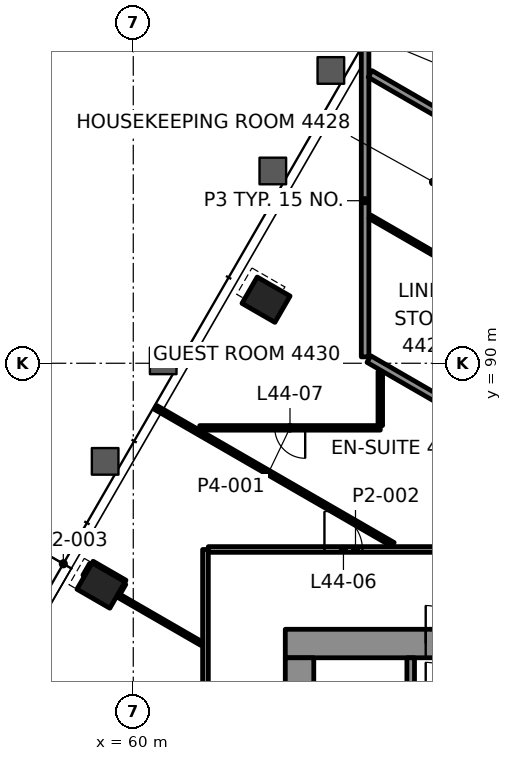
"""IFC4 building model, lengths in metres.
Left out: names, types, materials, properties, quantities, classifications, styles, units other than length and angle.
Written with IfcOpenShell. Run it as: python <this file> out.ifc"""

import sys

from ifc_helpers import new_model, si_unit, direction, frame, frame_2d, origin, origin_2d, place, context, subcontext, project, spatial, rectangle, hollow_rectangle, extrude, element, fill, save


model = new_model("IFC4")
c1 = context("Model", 3, precision=1e-05, world=origin(), true_north=direction((0.0, 1.0)))
c2 = subcontext(c1, "Body", "Model", "MODEL_VIEW")
j1 = project(units=[si_unit("LENGTHUNIT", "METRE"), si_unit("PLANEANGLEUNIT", "RADIAN")], contexts=[c1])
p1 = place(None, origin())
s1 = spatial("IfcSite", under=j1, at=p1, CompositionType="ELEMENT")
p2 = place(p1, origin())
s2 = spatial("IfcBuilding", under=s1, at=p2, CompositionType="ELEMENT")
p3 = place(p2, frame((0.0, 0.0, 190.9)))
s3 = spatial("IfcBuildingStorey", under=s2, at=p3, CompositionType="ELEMENT", Elevation=190.9)
for number, where, z_axis, x_axis in (
    (1, (63.494, 91.673, -0.0), (0.0, 0.0, 1.0), (-0.5, -0.866, 0.0)),
    (2, (59.151, 84.151, -0.0), (0.0, 0.0, 1.0), (-0.5, -0.866, 0.0)),
):
    element("IfcColumn", number, at=place(p3, frame(where, z_axis=z_axis, x_axis=x_axis)), inside=s3, PredefinedType="COLUMN", context=c2, shape_type="SweptSolid", body=[
        extrude(hollow_rectangle(XDim=0.8, YDim=1.0, WallThickness=0.05, at=origin_2d()), origin(), (0.0, 0.0, 1.0), 3.9),
    ])
p4 = place(p3, frame((64.0, 82.625, 0.0), z_axis=(0.0, 0.0, 1.0), x_axis=(1.0, 0.0, 0.0)))
e3 = element("IfcWall", 3, at=p4, inside=s3, PredefinedType="SHEAR", context=c2, shape_type="SweptSolid", body=[
    extrude(rectangle(XDim=22.0, YDim=0.75, at=frame_2d((11.0, 0.0))), origin(), (0.0, 0.0, 1.0), 3.7),
])
p5 = place(p4, frame((3.695, 0.0, 0.0)))
e4 = element("IfcOpeningElement", 4, at=p5, cuts=e3, PredefinedType="OPENING", context=c2, shape_type="SweptSolid", body=[
    extrude(rectangle(XDim=1.0, YDim=2.1, at=frame_2d((0.5, 1.05))), frame((0.0, 0.385, 0.0), z_axis=(0.0, -1.0, 0.0), x_axis=(1.0, 0.0, 0.0)), (0.0, 0.0, 1.0), 0.77),
])
p6 = place(p4, frame((17.505, 0.0, 0.0)))
e5 = element("IfcOpeningElement", 5, at=p6, cuts=e3, PredefinedType="OPENING", context=c2, shape_type="SweptSolid", body=[
    extrude(rectangle(XDim=1.0, YDim=2.1, at=frame_2d((0.5, 1.05))), frame((0.0, 0.385, 0.0), z_axis=(0.0, -1.0, 0.0), x_axis=(1.0, 0.0, 0.0)), (0.0, 0.0, 1.0), 0.77),
])
p7 = place(p4, frame((10.65, 0.0, 0.0)))
e6 = element("IfcOpeningElement", 6, at=p7, cuts=e3, PredefinedType="OPENING", context=c2, shape_type="SweptSolid", body=[
    extrude(rectangle(XDim=0.9, YDim=2.1, at=frame_2d((0.45, 1.05))), frame((0.0, 0.385, 0.0), z_axis=(0.0, -1.0, 0.0), x_axis=(1.0, 0.0, 0.0)), (0.0, 0.0, 1.0), 0.77),
])
p8 = place(p3, frame((64.375, 67.75, 0.0), z_axis=(0.0, 0.0, 1.0), x_axis=(0.0, 1.0, 0.0)))
e7 = element("IfcWall", 7, at=p8, inside=s3, PredefinedType="SHEAR", context=c2, shape_type="SweptSolid", body=[
    extrude(rectangle(XDim=14.5, YDim=0.75, at=frame_2d((7.25, 0.0))), origin(), (0.0, 0.0, 1.0), 3.7),
])
p9 = place(p8, frame((4.65, 0.0, 0.0)))
e8 = element("IfcOpeningElement", 8, at=p9, cuts=e7, PredefinedType="OPENING", context=c2, shape_type="SweptSolid", body=[
    extrude(rectangle(XDim=1.8, YDim=2.1, at=frame_2d((0.9, 1.05))), frame((0.0, 0.385, 0.0), z_axis=(0.0, -1.0, 0.0), x_axis=(1.0, 0.0, 0.0)), (0.0, 0.0, 1.0), 0.77),
])
p10 = place(p8, frame((2.55, 0.0, 0.0)))
e9 = element("IfcOpeningElement", 9, at=p10, cuts=e7, PredefinedType="OPENING", context=c2, shape_type="SweptSolid", body=[
    extrude(rectangle(XDim=0.9, YDim=2.1, at=frame_2d((0.45, 1.05))), frame((0.0, 0.385, 0.0), z_axis=(0.0, -1.0, 0.0), x_axis=(1.0, 0.0, 0.0)), (0.0, 0.0, 1.0), 0.77),
])
p11 = place(p8, frame((10.35, 0.0, 0.0)))
e10 = element("IfcOpeningElement", 10, at=p11, cuts=e7, PredefinedType="OPENING", context=c2, shape_type="SweptSolid", body=[
    extrude(rectangle(XDim=0.9, YDim=2.1, at=frame_2d((0.45, 1.05))), frame((0.0, 0.385, 0.0), z_axis=(0.0, -1.0, 0.0), x_axis=(1.0, 0.0, 0.0)), (0.0, 0.0, 1.0), 0.77),
])
p12 = place(p3, frame((61.976, 85.1, 0.0), z_axis=(0.0, 0.0, 1.0), x_axis=(1.0, 0.0, 0.0)))
e11 = element("IfcWall", 11, at=p12, inside=s3, PredefinedType="PARTITIONING", context=c2, shape_type="SweptSolid", body=[
    extrude(rectangle(XDim=7.744, YDim=0.15, at=frame_2d((3.872, 0.0))), origin(), (0.0, 0.0, 1.0), 3.1),
])
p13 = place(p12, frame((3.055, 0.0, 0.0)))
e12 = element("IfcOpeningElement", 12, at=p13, cuts=e11, PredefinedType="OPENING", context=c2, shape_type="SweptSolid", body=[
    extrude(rectangle(XDim=1.0, YDim=2.1, at=frame_2d((0.5, 1.05))), frame((0.0, 0.085, 0.0), z_axis=(0.0, -1.0, 0.0), x_axis=(1.0, 0.0, 0.0)), (0.0, 0.0, 1.0), 0.17),
])
p14 = place(p3, frame((66.5, 88.3, 0.0), z_axis=(0.0, 0.0, 1.0), x_axis=(-1.0, 0.0, 0.0)))
e13 = element("IfcWall", 13, at=p14, inside=s3, PredefinedType="PARTITIONING", context=c2, shape_type="SweptSolid", body=[
    extrude(rectangle(XDim=4.751, YDim=0.12, at=frame_2d((2.376, 0.0))), origin(), (0.0, 0.0, 1.0), 3.097),
])
p15 = place(p14, frame((1.976, 0.0, 0.0)))
e14 = element("IfcOpeningElement", 14, at=p15, cuts=e13, PredefinedType="OPENING", context=c2, shape_type="SweptSolid", body=[
    extrude(rectangle(XDim=0.8, YDim=2.1, at=frame_2d((0.4, 1.05))), frame((0.0, 0.07, 0.0), z_axis=(0.0, -1.0, 0.0), x_axis=(1.0, 0.0, 0.0)), (0.0, 0.0, 1.0), 0.14),
])
p16 = place(p3, frame((59.609, 83.944, 0.0), z_axis=(0.0, 0.0, 1.0), x_axis=(0.500264001326, 0.865872928886, 0.0)))
e15 = element("IfcWall", 15, at=p16, inside=s3, PredefinedType="PARTITIONING", context=c2, shape_type="SweptSolid", body=[
    extrude(rectangle(XDim=0.299, YDim=0.1, at=frame_2d((0.149, 0.0))), origin(), (0.0, 0.0, 1.0), 3.1),
])
p17 = place(p3, frame((58.718, 84.401, 0.0), z_axis=(0.0, 0.0, 1.0), x_axis=(0.499601298118, 0.866255472086, 0.0)))
e16 = element("IfcWall", 16, at=p17, inside=s3, PredefinedType="PARTITIONING", context=c2, shape_type="SweptSolid", body=[
    extrude(rectangle(XDim=0.349, YDim=0.1, at=frame_2d((0.174, 0.0))), origin(), (0.0, 0.0, 1.0), 3.1),
])
p18 = place(p3, frame((66.5, 88.361, 0.0), z_axis=(0.0, 0.0, 1.0), x_axis=(0.0, 1.0, 0.0)))
e17 = element("IfcWall", 17, at=p18, inside=s3, PredefinedType="PARTITIONING", context=c2, shape_type="SweptSolid", body=[
    extrude(rectangle(XDim=1.421, YDim=0.12, at=frame_2d((0.71, 0.0))), origin(), (0.0, 0.0, 1.0), 3.1),
])
p19 = place(p3, frame((66.1, 90.169, 0.0), z_axis=(0.0, 0.0, 1.0), x_axis=(0.0, 1.0, 0.0)))
e18 = element("IfcWall", 18, at=p19, inside=s3, PredefinedType="PARTITIONING", context=c2, shape_type="SweptSolid", body=[
    extrude(rectangle(XDim=8.218, YDim=0.2, at=frame_2d((4.109, 0.0))), origin(), (0.0, 0.0, 1.0), 3.022),
])
p20 = place(p3, frame((61.9, 68.476, 0.0), z_axis=(0.0, 0.0, 1.0), x_axis=(0.0, 1.0, 0.0)))
e19 = element("IfcWall", 19, at=p20, inside=s3, PredefinedType="PARTITIONING", context=c2, shape_type="SweptSolid", body=[
    extrude(rectangle(XDim=16.624, YDim=0.15, at=frame_2d((8.312, 0.0))), origin(), (0.0, 0.0, 1.0), 3.1),
])
p21 = place(p20, frame((8.276, 0.0, 0.0)))
e20 = element("IfcOpeningElement", 20, at=p21, cuts=e19, PredefinedType="OPENING", context=c2, shape_type="SweptSolid", body=[
    extrude(rectangle(XDim=1.0, YDim=2.1, at=frame_2d((0.5, 1.05))), frame((0.0, 0.085, 0.0), z_axis=(0.0, -1.0, 0.0), x_axis=(1.0, 0.0, 0.0)), (0.0, 0.0, 1.0), 0.17),
])
p22 = place(p3, frame((69.573, 95.685, 0.0), z_axis=(0.0, 0.0, 1.0), x_axis=(-0.8660191159, 0.500010890777, 0.0)))
e21 = element("IfcWall", 21, at=p22, inside=s3, PredefinedType="PARTITIONING", context=c2, shape_type="SweptSolid", body=[
    extrude(rectangle(XDim=3.859, YDim=0.2, at=frame_2d((1.929, 0.0))), origin(), (0.0, 0.0, 1.0), 3.022),
])
p23 = place(p3, frame((69.599, 91.909, 0.0), z_axis=(0.0, 0.0, 1.0), x_axis=(-0.866016482536, 0.500015451737, 0.0)))
e22 = element("IfcWall", 22, at=p23, inside=s3, PredefinedType="PARTITIONING", context=c2, shape_type="SweptSolid", body=[
    extrude(rectangle(XDim=3.895, YDim=0.1, at=frame_2d((1.948, 0.0))), origin(), (0.0, 0.0, 1.0), 3.1),
])
p24 = place(p3, frame((69.573, 88.163, 0.0), z_axis=(0.0, 0.0, 1.0), x_axis=(-0.866043624834, 0.499968438888, 0.0)))
e23 = element("IfcWall", 23, at=p24, inside=s3, PredefinedType="PARTITIONING", context=c2, shape_type="SweptSolid", body=[
    extrude(rectangle(XDim=3.895, YDim=0.2, at=frame_2d((1.947, 0.0))), origin(), (0.0, 0.0, 1.0), 3.1),
])
p25 = place(p3, frame((66.835, 85.23, 0.0), z_axis=(0.0, 0.0, 1.0), x_axis=(-0.866029508188, 0.499992890897, 0.0)))
e24 = element("IfcWall", 24, at=p25, inside=s3, PredefinedType="PARTITIONING", context=c2, shape_type="SweptSolid", body=[
    extrude(rectangle(XDim=7.215, YDim=0.12, at=frame_2d((3.608, 0.0))), origin(), (0.0, 0.0, 1.0), 3.022),
])
p26 = place(p3, frame((59.783, 84.247, 0.0), z_axis=(0.0, 0.0, 1.0), x_axis=(-0.866039090965, 0.499976292358, 0.0)))
e25 = element("IfcWall", 25, at=p26, inside=s3, PredefinedType="PARTITIONING", context=c2, shape_type="SweptSolid", body=[
    extrude(rectangle(XDim=0.999, YDim=0.1, at=frame_2d((0.5, 0.0))), origin(), (0.0, 0.0, 1.0), 3.022),
])
p27 = place(p3, frame((61.799, 82.622, 0.0), z_axis=(0.0, 0.0, 1.0), x_axis=(-0.866013897511, 0.50001992892, 0.0)))
e26 = element("IfcWall", 26, at=p27, inside=s3, PredefinedType="PARTITIONING", context=c2, shape_type="SweptSolid", body=[
    extrude(rectangle(XDim=2.558, YDim=0.1, at=frame_2d((1.279, 0.0))), origin(), (0.0, 0.0, 1.0), 3.1),
])
p28 = place(p3, frame((67.3, 81.28, 0.0), z_axis=(0.0, 0.0, 1.0), x_axis=(0.0, 1.0, 0.0)))
e27 = element("IfcWall", 27, at=p28, inside=s3, PredefinedType="PARTITIONING", context=c2, shape_type="SweptSolid", body=[
    extrude(rectangle(XDim=0.97, YDim=0.2, at=frame_2d((0.485, 0.0))), origin(), (0.0, 0.0, 1.0), 3.7),
])
p29 = place(p13, origin())
e28 = element("IfcDoor", 28, at=p29, inside=s3, OperationType="SINGLE_SWING_LEFT", PredefinedType="DOOR", context=c2, shape_type="SweptSolid", body=[
    extrude(rectangle(XDim=1.0, YDim=2.1, at=frame_2d((0.5, 1.05))), frame((0.0, 0.025, 0.0), z_axis=(0.0, -1.0, 0.0), x_axis=(1.0, 0.0, 0.0)), (0.0, 0.0, 1.0), 0.05),
])
fill(e12, e28)
p30 = place(p15, origin())
e29 = element("IfcDoor", 29, at=p30, inside=s3, OperationType="SINGLE_SWING_LEFT", PredefinedType="DOOR", context=c2, shape_type="SweptSolid", body=[
    extrude(rectangle(XDim=0.8, YDim=2.1, at=frame_2d((0.4, 1.05))), frame((0.0, 0.025, 0.0), z_axis=(0.0, -1.0, 0.0), x_axis=(1.0, 0.0, 0.0)), (0.0, 0.0, 1.0), 0.05),
])
fill(e14, e29)
p31 = place(p5, origin())
e30 = element("IfcDoor", 30, at=p31, inside=s3, OperationType="SINGLE_SWING_LEFT", PredefinedType="DOOR", context=c2, shape_type="SweptSolid", body=[
    extrude(rectangle(XDim=1.0, YDim=2.1, at=frame_2d((0.5, 1.05))), frame((0.0, 0.095, 0.0), z_axis=(0.0, -1.0, 0.0), x_axis=(1.0, 0.0, 0.0)), (0.0, 0.0, 1.0), 0.19),
])
fill(e4, e30)
save(model, sys.argv[1])
